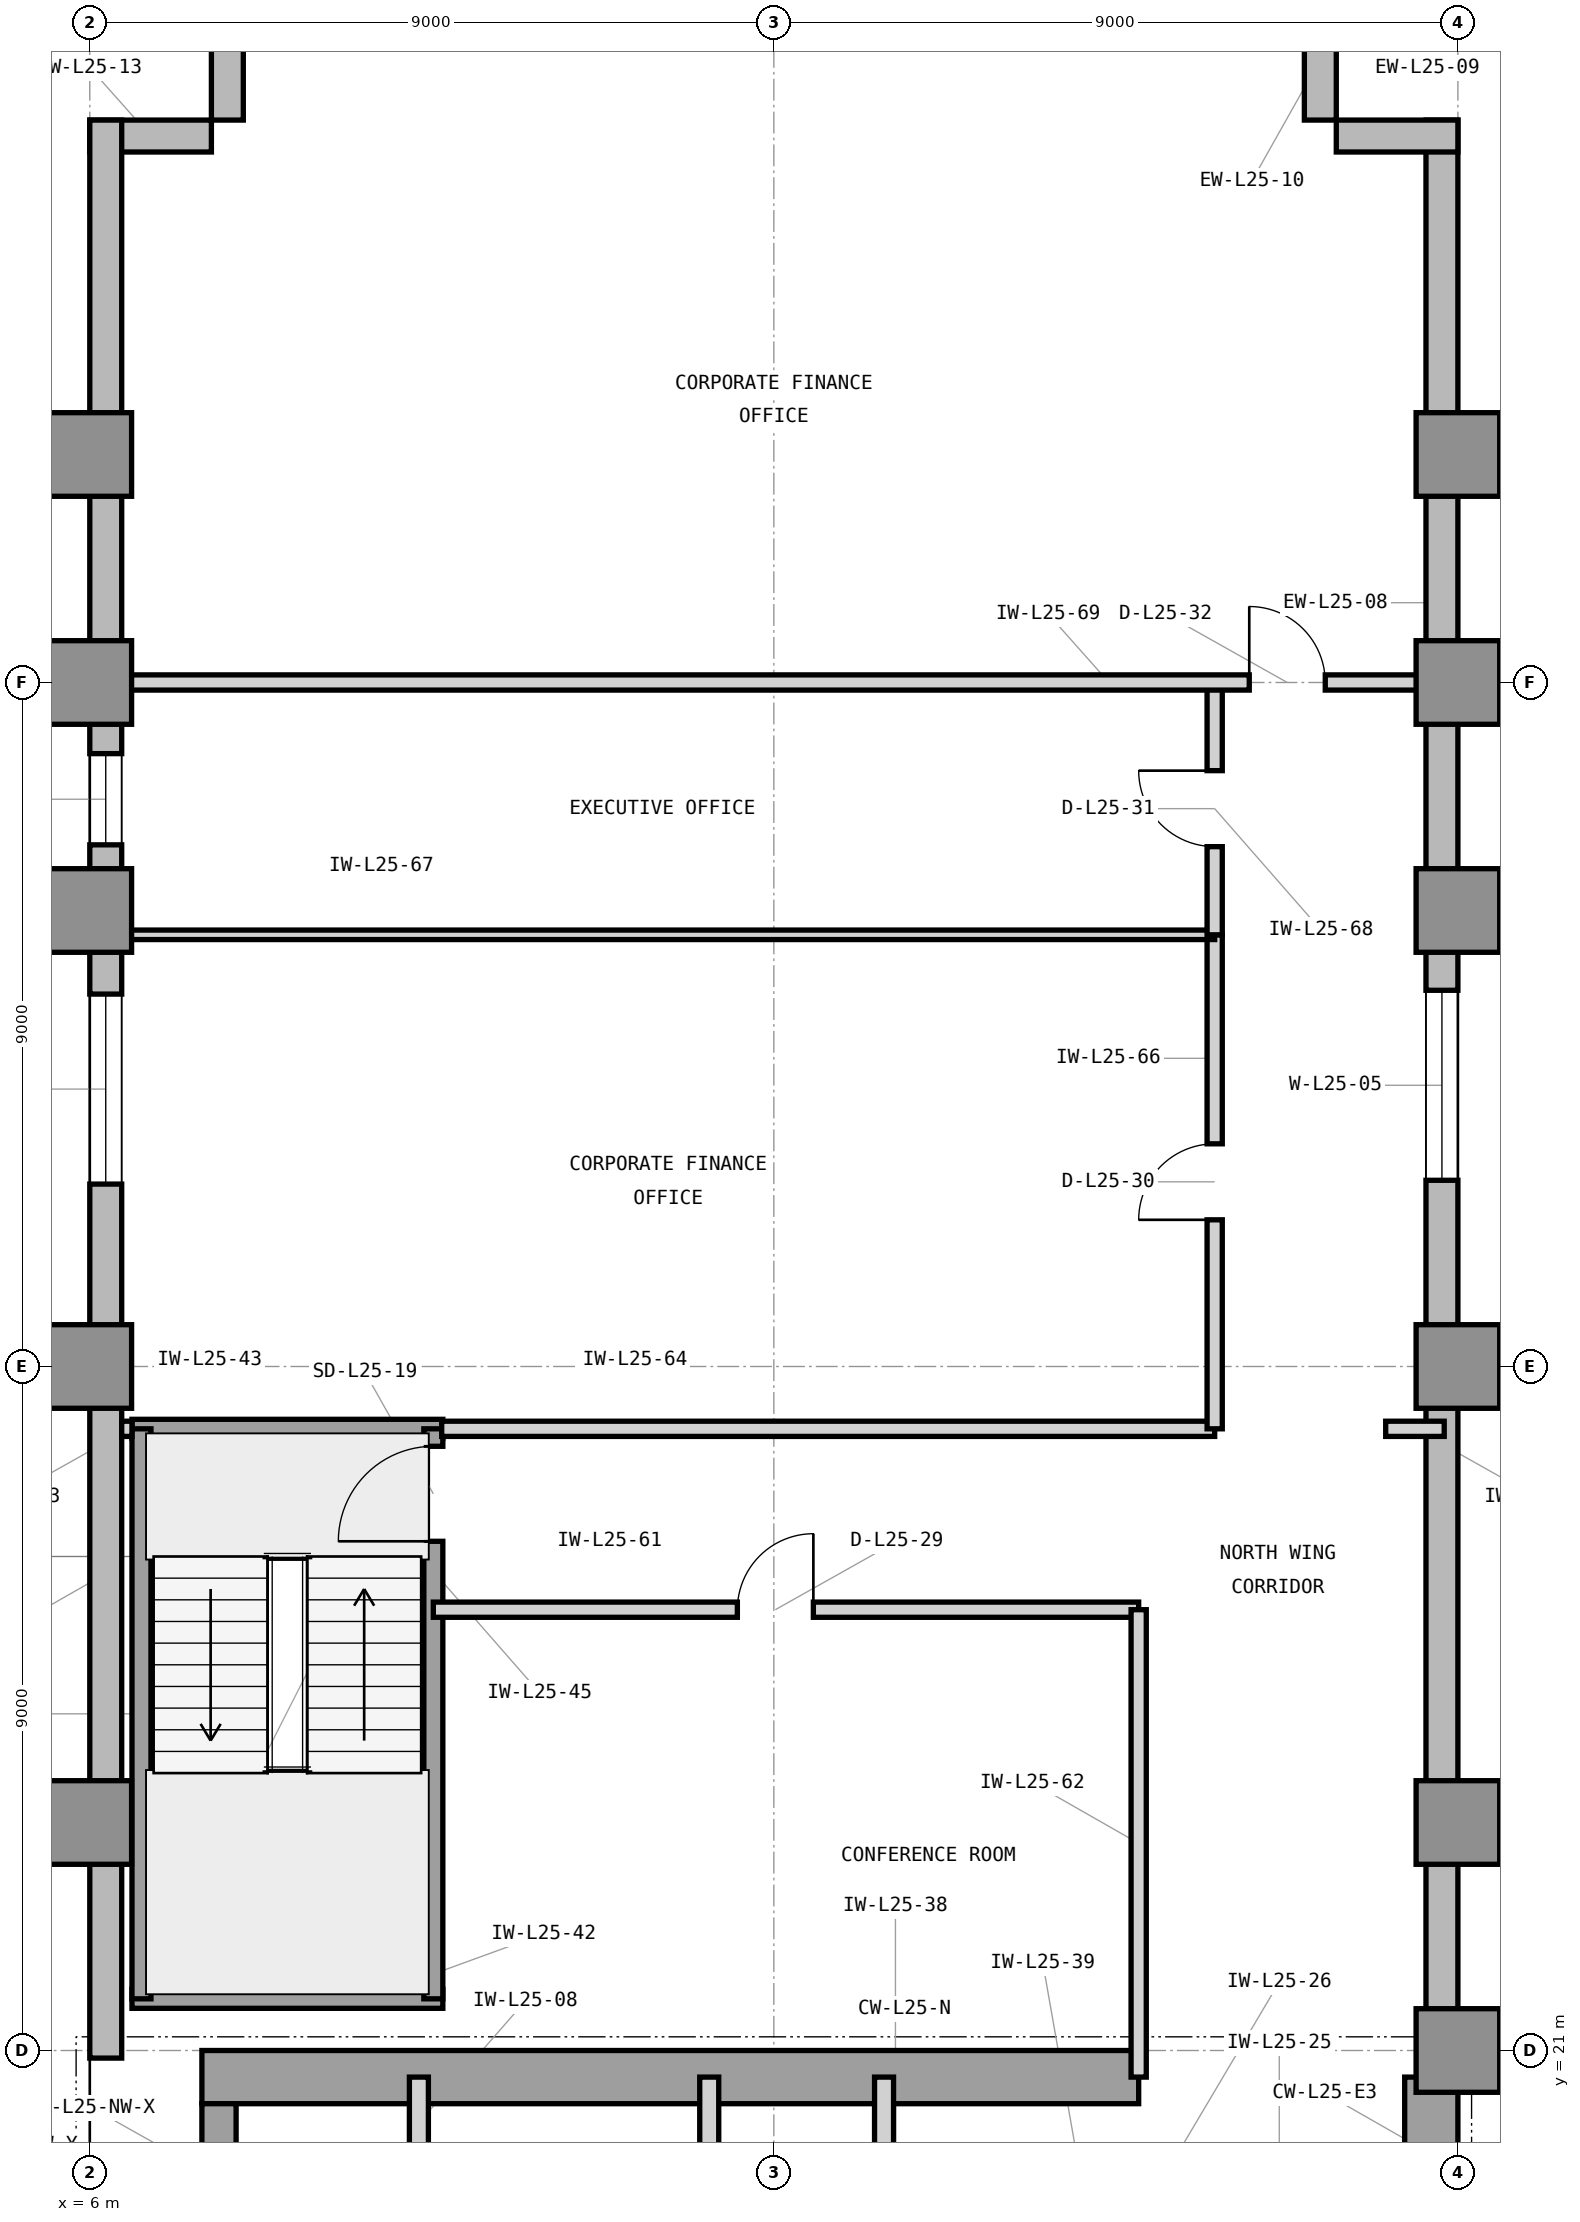
"""IFC4 building model, lengths in metres.
Left out: names, types, materials, properties, quantities, classifications, styles, units other than length and angle.
Written with IfcOpenShell. Run it as: python <this file> out.ifc"""

import sys

from ifc_helpers import new_model, si_unit, direction, frame, frame_2d, origin, origin_2d, place, context, subcontext, project, spatial, rectangle, extrude, element, fill, save


model = new_model("IFC4")
c1 = context("Model", 3, precision=1e-05, world=origin(), true_north=direction((0.0, 1.0)))
c2 = subcontext(c1, "Body", "Model", "MODEL_VIEW")
j1 = project(units=[si_unit("LENGTHUNIT", "METRE"), si_unit("PLANEANGLEUNIT", "RADIAN")], contexts=[c1])
p1 = place(None, origin())
s1 = spatial("IfcSite", under=j1, at=p1, CompositionType="ELEMENT")
p2 = place(p1, origin())
s2 = spatial("IfcBuilding", under=s1, at=p2, CompositionType="ELEMENT")
p3 = place(p2, frame((0.0, 0.0, 108.9)))
s3 = spatial("IfcBuildingStorey", under=s2, at=p3, CompositionType="ELEMENT", Elevation=108.9)
p4 = place(p3, frame((7.475, 20.65, 0.0), z_axis=(0.0, 0.0, 1.0), x_axis=(1.0, 0.0, 0.0)))
e1 = element("IfcWall", 1, at=p4, inside=s3, PredefinedType="SHEAR", context=c2, shape_type="SweptSolid", body=[
    extrude(rectangle(XDim=12.325, YDim=0.7, at=frame_2d((6.163, 0.0))), origin(), (0.0, 0.0, 1.0), 3.9),
])
p5 = place(p3, frame((23.65, 16.6, 0.0), z_axis=(0.0, 0.0, 1.0), x_axis=(0.0, 1.0, 0.0)))
e2 = element("IfcWall", 2, at=p5, inside=s3, PredefinedType="SHEAR", context=c2, shape_type="SweptSolid", body=[
    extrude(rectangle(XDim=4.05, YDim=0.7, at=frame_2d((2.025, 0.0))), origin(), (0.0, 0.0, 1.0), 3.9),
])
p6 = place(p3, frame((7.7, 19.575, 0.0), z_axis=(0.0, 0.0, 1.0), x_axis=(0.0, 1.0, 0.0)))
e3 = element("IfcWall", 3, at=p6, inside=s3, PredefinedType="SHEAR", context=c2, shape_type="SweptSolid", body=[
    extrude(rectangle(XDim=0.725, YDim=0.45, at=frame_2d((0.363, 0.0))), origin(), (0.0, 0.0, 1.0), 3.9),
])
for number, where, z_axis, x_axis in (
    (4, (24.0, 21.0, 0.0), (0.0, 0.0, 1.0), (1.0, 0.0, 0.0)),
    (5, (6.0, 24.0, 0.0), (0.0, 0.0, 1.0), (1.0, 0.0, 0.0)),
    (6, (24.0, 24.0, 0.0), (0.0, 0.0, 1.0), (1.0, 0.0, 0.0)),
    (7, (6.0, 30.0, 0.0), (0.0, 0.0, 1.0), (1.0, 0.0, 0.0)),
    (8, (24.0, 30.0, 0.0), (0.0, 0.0, 1.0), (1.0, 0.0, 0.0)),
    (9, (6.0, 36.0, 0.0), (0.0, 0.0, 1.0), (1.0, 0.0, 0.0)),
    (10, (24.0, 36.0, 0.0), (0.0, 0.0, 1.0), (1.0, 0.0, 0.0)),
    (11, (6.0, 39.0, 0.0), (0.0, 0.0, 1.0), (1.0, 0.0, 0.0)),
    (12, (24.0, 39.0, 0.0), (0.0, 0.0, 1.0), (1.0, 0.0, 0.0)),
    (13, (6.0, 42.0, 0.0), (0.0, 0.0, 1.0), (1.0, 0.0, 0.0)),
    (14, (24.0, 42.0, 0.0), (0.0, 0.0, 1.0), (1.0, 0.0, 0.0)),
):
    element("IfcColumn", number, at=place(p3, frame(where, z_axis=z_axis, x_axis=x_axis)), inside=s3, PredefinedType="COLUMN", context=c2, shape_type="SweptSolid", body=[
        extrude(rectangle(XDim=1.1, YDim=1.1, at=origin_2d()), origin(), (0.0, 0.0, 1.0), 3.9),
    ])
p7 = place(p3, frame((61.4, 20.79, 0.0), z_axis=(0.0, 0.0, 1.0), x_axis=(-1.0, 0.0, 0.0)))
e15 = element("IfcWall", 15, at=p7, inside=s3, PredefinedType="STANDARD", context=c2, shape_type="SweptSolid", body=[
    extrude(rectangle(XDim=37.4, YDim=0.42, at=frame_2d((18.7, 0.0))), origin(), (0.0, 0.0, 1.0), 3.7),
])
p8 = place(p7, frame((35.222, 0.0, 0.85)))
e16 = element("IfcOpeningElement", 16, at=p8, cuts=e15, PredefinedType="OPENING", context=c2, shape_type="SweptSolid", body=[
    extrude(rectangle(XDim=1.2, YDim=2.25, at=frame_2d((0.6, 1.125))), frame((0.0, 0.22, 0.0), z_axis=(0.0, -1.0, 0.0), x_axis=(1.0, 0.0, 0.0)), (0.0, 0.0, 1.0), 0.44),
])
p9 = place(p7, frame((29.386, 0.0, 0.85)))
e17 = element("IfcOpeningElement", 17, at=p9, cuts=e15, PredefinedType="OPENING", context=c2, shape_type="SweptSolid", body=[
    extrude(rectangle(XDim=2.5, YDim=2.25, at=frame_2d((1.25, 1.125))), frame((0.0, 0.22, 0.0), z_axis=(0.0, -1.0, 0.0), x_axis=(1.0, 0.0, 0.0)), (0.0, 0.0, 1.0), 0.44),
])
p10 = place(p7, frame((20.386, 0.0, 0.85)))
e18 = element("IfcOpeningElement", 18, at=p10, cuts=e15, PredefinedType="OPENING", context=c2, shape_type="SweptSolid", body=[
    extrude(rectangle(XDim=2.5, YDim=2.25, at=frame_2d((1.25, 1.125))), frame((0.0, 0.22, 0.0), z_axis=(0.0, -1.0, 0.0), x_axis=(1.0, 0.0, 0.0)), (0.0, 0.0, 1.0), 0.44),
])
p11 = place(p7, frame((8.336, 0.0, 0.85)))
e19 = element("IfcOpeningElement", 19, at=p11, cuts=e15, PredefinedType="OPENING", context=c2, shape_type="SweptSolid", body=[
    extrude(rectangle(XDim=1.2, YDim=2.25, at=frame_2d((0.6, 1.125))), frame((0.0, 0.22, 0.0), z_axis=(0.0, -1.0, 0.0), x_axis=(1.0, 0.0, 0.0)), (0.0, 0.0, 1.0), 0.44),
])
p12 = place(p3, frame((23.79, 21.0, 0.0), z_axis=(0.0, 0.0, 1.0), x_axis=(0.0, 1.0, 0.0)))
e20 = element("IfcWall", 20, at=p12, inside=s3, PredefinedType="STANDARD", context=c2, shape_type="SweptSolid", body=[
    extrude(rectangle(XDim=25.4, YDim=0.42, at=frame_2d((12.7, 0.0))), origin(), (0.0, 0.0, 1.0), 3.7),
])
p13 = place(p12, frame((11.45, 0.0, 0.85)))
e21 = element("IfcOpeningElement", 21, at=p13, cuts=e20, PredefinedType="OPENING", context=c2, shape_type="SweptSolid", body=[
    extrude(rectangle(XDim=2.5, YDim=2.25, at=frame_2d((1.25, 1.125))), frame((0.0, 0.22, 0.0), z_axis=(0.0, -1.0, 0.0), x_axis=(1.0, 0.0, 0.0)), (0.0, 0.0, 1.0), 0.44),
])
for number, where, z_axis, x_axis in (
    (22, (24.0, 46.19, 0.0), (0.0, 0.0, 1.0), (-1.0, 0.0, 0.0)),
    (23, (22.19, 46.4, 0.0), (0.0, 0.0, 1.0), (0.0, 1.0, 0.0)),
    (24, (7.81, 48.0, 0.0), (0.0, 0.0, 1.0), (0.0, -1.0, 0.0)),
    (25, (7.6, 46.19, 0.0), (0.0, 0.0, 1.0), (-1.0, 0.0, 0.0)),
):
    element("IfcWall", number, at=place(p3, frame(where, z_axis=z_axis, x_axis=x_axis)), inside=s3, PredefinedType="STANDARD", context=c2, shape_type="SweptSolid", body=[
        extrude(rectangle(XDim=1.6, YDim=0.42, at=frame_2d((0.8, 0.0))), origin(), (0.0, 0.0, 1.0), 3.7),
    ])
p14 = place(p3, frame((6.21, 46.4, 0.0), z_axis=(0.0, 0.0, 1.0), x_axis=(0.0, -1.0, 0.0)))
e26 = element("IfcWall", 26, at=p14, inside=s3, PredefinedType="STANDARD", context=c2, shape_type="SweptSolid", body=[
    extrude(rectangle(XDim=25.5, YDim=0.42, at=frame_2d((12.75, 0.0))), origin(), (0.0, 0.0, 1.0), 3.7),
])
p15 = place(p14, frame((11.5, 0.0, 0.85)))
e27 = element("IfcOpeningElement", 27, at=p15, cuts=e26, PredefinedType="OPENING", context=c2, shape_type="SweptSolid", body=[
    extrude(rectangle(XDim=2.5, YDim=2.25, at=frame_2d((1.25, 1.125))), frame((0.0, 0.22, 0.0), z_axis=(0.0, -1.0, 0.0), x_axis=(1.0, 0.0, 0.0)), (0.0, 0.0, 1.0), 0.44),
])
p16 = place(p14, frame((8.336, 0.0, 0.85)))
e28 = element("IfcOpeningElement", 28, at=p16, cuts=e26, PredefinedType="OPENING", context=c2, shape_type="SweptSolid", body=[
    extrude(rectangle(XDim=1.2, YDim=2.25, at=frame_2d((0.6, 1.125))), frame((0.0, 0.22, 0.0), z_axis=(0.0, -1.0, 0.0), x_axis=(1.0, 0.0, 0.0)), (0.0, 0.0, 1.0), 0.44),
])
p17 = place(p3, frame((10.33, 19.45, 0.0), z_axis=(0.0, 0.0, 1.0), x_axis=(0.0, 1.0, 0.0)))
e29 = element("IfcWall", 29, at=p17, inside=s3, PredefinedType="PARTITIONING", context=c2, shape_type="SweptSolid", body=[
    extrude(rectangle(XDim=1.2, YDim=0.25, at=frame_2d((0.6, 0.0))), origin(), (0.0, 0.0, 1.0), 2.917),
])
for number, where, z_axis, x_axis in (
    (30, (14.15, 16.7, 0.0), (0.0, 0.0, 1.0), (0.0, 1.0, 0.0)),
    (31, (16.45, 16.7, 0.0), (0.0, 0.0, 1.0), (0.0, 1.0, 0.0)),
):
    element("IfcWall", number, at=place(p3, frame(where, z_axis=z_axis, x_axis=x_axis)), inside=s3, PredefinedType="PARTITIONING", context=c2, shape_type="SweptSolid", body=[
        extrude(rectangle(XDim=3.95, YDim=0.25, at=frame_2d((1.975, 0.0))), origin(), (0.0, 0.0, 1.0), 3.69),
    ])
for number, where, z_axis, x_axis in (
    (32, (6.555, 21.68, 0.0), (0.0, 0.0, 1.0), (1.0, 0.0, 0.0)),
    (33, (6.555, 29.18, 0.0), (0.0, 0.0, 1.0), (1.0, 0.0, 0.0)),
):
    element("IfcWall", number, at=place(p3, frame(where, z_axis=z_axis, x_axis=x_axis)), inside=s3, PredefinedType="SHEAR", context=c2, shape_type="SweptSolid", body=[
        extrude(rectangle(XDim=4.09, YDim=0.25, at=frame_2d((2.045, 0.0))), origin(), (0.0, 0.0, 1.0), 3.9),
    ])
p18 = place(p3, frame((6.68, 21.68, 0.0), z_axis=(0.0, 0.0, 1.0), x_axis=(0.0, 1.0, 0.0)))
e34 = element("IfcWall", 34, at=p18, inside=s3, PredefinedType="SHEAR", context=c2, shape_type="SweptSolid", body=[
    extrude(rectangle(XDim=7.5, YDim=0.25, at=frame_2d((3.75, 0.0))), origin(), (0.0, 0.0, 1.0), 3.9),
])
p19 = place(p3, frame((10.52, 21.68, 0.0), z_axis=(0.0, 0.0, 1.0), x_axis=(0.0, 1.0, 0.0)))
e35 = element("IfcWall", 35, at=p19, inside=s3, PredefinedType="SHEAR", context=c2, shape_type="SweptSolid", body=[
    extrude(rectangle(XDim=7.5, YDim=0.25, at=frame_2d((3.75, 0.0))), origin(), (0.0, 0.0, 1.0), 3.9),
])
p20 = place(p19, frame((6.02, 0.0, 0.0)))
e36 = element("IfcOpeningElement", 36, at=p20, cuts=e35, PredefinedType="OPENING", context=c2, shape_type="SweptSolid", body=[
    extrude(rectangle(XDim=1.25, YDim=2.2, at=frame_2d((0.625, 1.1))), frame((0.0, 0.135, 0.0), z_axis=(0.0, -1.0, 0.0), x_axis=(1.0, 0.0, 0.0)), (0.0, 0.0, 1.0), 0.27),
])
p21 = place(p3, frame((10.52, 26.8, 0.0), z_axis=(0.0, 0.0, 1.0), x_axis=(1.0, 0.0, 0.0)))
e37 = element("IfcWall", 37, at=p21, inside=s3, PredefinedType="PARTITIONING", context=c2, shape_type="SweptSolid", body=[
    extrude(rectangle(XDim=9.28, YDim=0.2, at=frame_2d((4.64, 0.0))), origin(), (0.0, 0.0, 1.0), 3.69),
])
p22 = place(p21, frame((4.0, 0.0, 0.0)))
e38 = element("IfcOpeningElement", 38, at=p22, cuts=e37, PredefinedType="OPENING", context=c2, shape_type="SweptSolid", body=[
    extrude(rectangle(XDim=1.0, YDim=2.15, at=frame_2d((0.5, 1.075))), frame((0.0, 0.11, 0.0), z_axis=(0.0, -1.0, 0.0), x_axis=(1.0, 0.0, 0.0)), (0.0, 0.0, 1.0), 0.22),
])
p23 = place(p3, frame((19.8, 20.65, 0.0), z_axis=(0.0, 0.0, 1.0), x_axis=(0.0, 1.0, 0.0)))
e39 = element("IfcWall", 39, at=p23, inside=s3, PredefinedType="PARTITIONING", context=c2, shape_type="SweptSolid", body=[
    extrude(rectangle(XDim=6.15, YDim=0.2, at=frame_2d((3.075, 0.0))), origin(), (0.0, 0.0, 1.0), 3.69),
])
p24 = place(p3, frame((6.42, 29.18, 0.0), z_axis=(0.0, 0.0, 1.0), x_axis=(1.0, 0.0, 0.0)))
e40 = element("IfcWall", 40, at=p24, inside=s3, PredefinedType="PARTITIONING", context=c2, shape_type="SweptSolid", body=[
    extrude(rectangle(XDim=0.135, YDim=0.2, at=frame_2d((0.067, 0.0))), origin(), (0.0, 0.0, 1.0), 3.69),
])
p25 = place(p3, frame((10.63, 29.18, 0.0), z_axis=(0.0, 0.0, 1.0), x_axis=(1.0, 0.0, 0.0)))
e41 = element("IfcWall", 41, at=p25, inside=s3, PredefinedType="PARTITIONING", context=c2, shape_type="SweptSolid", body=[
    extrude(rectangle(XDim=10.17, YDim=0.2, at=frame_2d((5.085, 0.0))), origin(), (0.0, 0.0, 1.0), 3.69),
])
p26 = place(p3, frame((23.05, 29.18, 0.0), z_axis=(0.0, 0.0, 1.0), x_axis=(1.0, 0.0, 0.0)))
e42 = element("IfcWall", 42, at=p26, inside=s3, PredefinedType="PARTITIONING", context=c2, shape_type="SweptSolid", body=[
    extrude(rectangle(XDim=0.77, YDim=0.2, at=frame_2d((0.385, 0.0))), origin(), (0.0, 0.0, 1.0), 3.69),
])
p27 = place(p3, frame((20.8, 29.18, 0.0), z_axis=(0.0, 0.0, 1.0), x_axis=(0.0, 1.0, 0.0)))
e43 = element("IfcWall", 43, at=p27, inside=s3, PredefinedType="PARTITIONING", context=c2, shape_type="SweptSolid", body=[
    extrude(rectangle(XDim=6.5, YDim=0.2, at=frame_2d((3.25, 0.0))), origin(), (0.0, 0.0, 1.0), 3.69),
])
p28 = place(p27, frame((2.75, 0.0, 0.0)))
e44 = element("IfcOpeningElement", 44, at=p28, cuts=e43, PredefinedType="OPENING", context=c2, shape_type="SweptSolid", body=[
    extrude(rectangle(XDim=1.0, YDim=2.15, at=frame_2d((0.5, 1.075))), frame((0.0, 0.11, 0.0), z_axis=(0.0, -1.0, 0.0), x_axis=(1.0, 0.0, 0.0)), (0.0, 0.0, 1.0), 0.22),
])
p29 = place(p3, frame((6.18, 35.68, 0.0), z_axis=(0.0, 0.0, 1.0), x_axis=(1.0, 0.0, 0.0)))
e45 = element("IfcWall", 45, at=p29, inside=s3, PredefinedType="PARTITIONING", context=c2, shape_type="SweptSolid", body=[
    extrude(rectangle(XDim=14.62, YDim=0.125, at=frame_2d((7.31, 0.0))), origin(), (0.0, 0.0, 1.0), 3.69),
])
p30 = place(p3, frame((20.8, 35.68, 0.0), z_axis=(0.0, 0.0, 1.0), x_axis=(0.0, 1.0, 0.0)))
e46 = element("IfcWall", 46, at=p30, inside=s3, PredefinedType="PARTITIONING", context=c2, shape_type="SweptSolid", body=[
    extrude(rectangle(XDim=3.32, YDim=0.2, at=frame_2d((1.66, 0.0))), origin(), (0.0, 0.0, 1.0), 3.69),
])
p31 = place(p30, frame((1.16, 0.0, 0.0)))
e47 = element("IfcOpeningElement", 47, at=p31, cuts=e46, PredefinedType="OPENING", context=c2, shape_type="SweptSolid", body=[
    extrude(rectangle(XDim=1.0, YDim=2.15, at=frame_2d((0.5, 1.075))), frame((0.0, 0.11, 0.0), z_axis=(0.0, -1.0, 0.0), x_axis=(1.0, 0.0, 0.0)), (0.0, 0.0, 1.0), 0.22),
])
p32 = place(p3, frame((6.18, 39.0, 0.0), z_axis=(0.0, 0.0, 1.0), x_axis=(1.0, 0.0, 0.0)))
e48 = element("IfcWall", 48, at=p32, inside=s3, PredefinedType="PARTITIONING", context=c2, shape_type="SweptSolid", body=[
    extrude(rectangle(XDim=17.64, YDim=0.2, at=frame_2d((8.82, 0.0))), origin(), (0.0, 0.0, 1.0), 2.917),
])
p33 = place(p32, frame((15.075, 0.0, 0.0)))
e49 = element("IfcOpeningElement", 49, at=p33, cuts=e48, PredefinedType="OPENING", context=c2, shape_type="SweptSolid", body=[
    extrude(rectangle(XDim=1.0, YDim=2.15, at=frame_2d((0.5, 1.075))), frame((0.0, 0.11, 0.0), z_axis=(0.0, -1.0, 0.0), x_axis=(1.0, 0.0, 0.0)), (0.0, 0.0, 1.0), 0.22),
])
p34 = place(p13, origin())
e50 = element("IfcWindow", 50, at=p34, inside=s3, PartitioningType="SINGLE_PANEL", PredefinedType="WINDOW", context=c2, shape_type="SweptSolid", body=[
    extrude(rectangle(XDim=2.5, YDim=2.25, at=frame_2d((1.25, 1.125))), frame((0.0, 0.11, 0.0), z_axis=(0.0, -1.0, 0.0), x_axis=(1.0, 0.0, 0.0)), (0.0, 0.0, 1.0), 0.06),
])
fill(e21, e50)
p35 = place(p15, origin())
e51 = element("IfcWindow", 51, at=p35, inside=s3, PartitioningType="SINGLE_PANEL", PredefinedType="WINDOW", context=c2, shape_type="SweptSolid", body=[
    extrude(rectangle(XDim=2.5, YDim=2.25, at=frame_2d((1.25, 1.125))), frame((0.0, 0.11, 0.0), z_axis=(0.0, -1.0, 0.0), x_axis=(1.0, 0.0, 0.0)), (0.0, 0.0, 1.0), 0.06),
])
fill(e27, e51)
p36 = place(p20, origin())
e52 = element("IfcDoor", 52, at=p36, inside=s3, OperationType="SINGLE_SWING_LEFT", PredefinedType="DOOR", context=c2, shape_type="SweptSolid", body=[
    extrude(rectangle(XDim=1.25, YDim=2.2, at=frame_2d((0.625, 1.1))), frame((0.0, 0.025, 0.0), z_axis=(0.0, -1.0, 0.0), x_axis=(1.0, 0.0, 0.0)), (0.0, 0.0, 1.0), 0.05),
])
fill(e36, e52)
p37 = place(p22, origin())
e53 = element("IfcDoor", 53, at=p37, inside=s3, OperationType="SINGLE_SWING_RIGHT", PredefinedType="DOOR", context=c2, shape_type="SweptSolid", body=[
    extrude(rectangle(XDim=1.0, YDim=2.15, at=frame_2d((0.5, 1.075))), frame((0.0, 0.025, 0.0), z_axis=(0.0, -1.0, 0.0), x_axis=(1.0, 0.0, 0.0)), (0.0, 0.0, 1.0), 0.05),
])
fill(e38, e53)
p38 = place(p28, origin())
e54 = element("IfcDoor", 54, at=p38, inside=s3, OperationType="SINGLE_SWING_LEFT", PredefinedType="DOOR", context=c2, shape_type="SweptSolid", body=[
    extrude(rectangle(XDim=1.0, YDim=2.15, at=frame_2d((0.5, 1.075))), frame((0.0, 0.025, 0.0), z_axis=(0.0, -1.0, 0.0), x_axis=(1.0, 0.0, 0.0)), (0.0, 0.0, 1.0), 0.05),
])
fill(e44, e54)
p39 = place(p31, origin())
e55 = element("IfcDoor", 55, at=p39, inside=s3, OperationType="SINGLE_SWING_RIGHT", PredefinedType="DOOR", context=c2, shape_type="SweptSolid", body=[
    extrude(rectangle(XDim=1.0, YDim=2.15, at=frame_2d((0.5, 1.075))), frame((0.0, 0.025, 0.0), z_axis=(0.0, -1.0, 0.0), x_axis=(1.0, 0.0, 0.0)), (0.0, 0.0, 1.0), 0.05),
])
fill(e47, e55)
p40 = place(p33, origin())
e56 = element("IfcDoor", 56, at=p40, inside=s3, OperationType="SINGLE_SWING_LEFT", PredefinedType="DOOR", context=c2, shape_type="SweptSolid", body=[
    extrude(rectangle(XDim=1.0, YDim=2.15, at=frame_2d((0.5, 1.075))), frame((0.0, 0.025, 0.0), z_axis=(0.0, -1.0, 0.0), x_axis=(1.0, 0.0, 0.0)), (0.0, 0.0, 1.0), 0.05),
])
fill(e49, e56)
p41 = place(p16, origin())
e57 = element("IfcWindow", 57, at=p41, inside=s3, PartitioningType="SINGLE_PANEL", PredefinedType="WINDOW", context=c2, shape_type="SweptSolid", body=[
    extrude(rectangle(XDim=1.2, YDim=2.25, at=frame_2d((0.6, 1.125))), frame((0.0, 0.11, 0.0), z_axis=(0.0, -1.0, 0.0), x_axis=(1.0, 0.0, 0.0)), (0.0, 0.0, 1.0), 0.06),
])
fill(e28, e57)
save(model, sys.argv[1])
